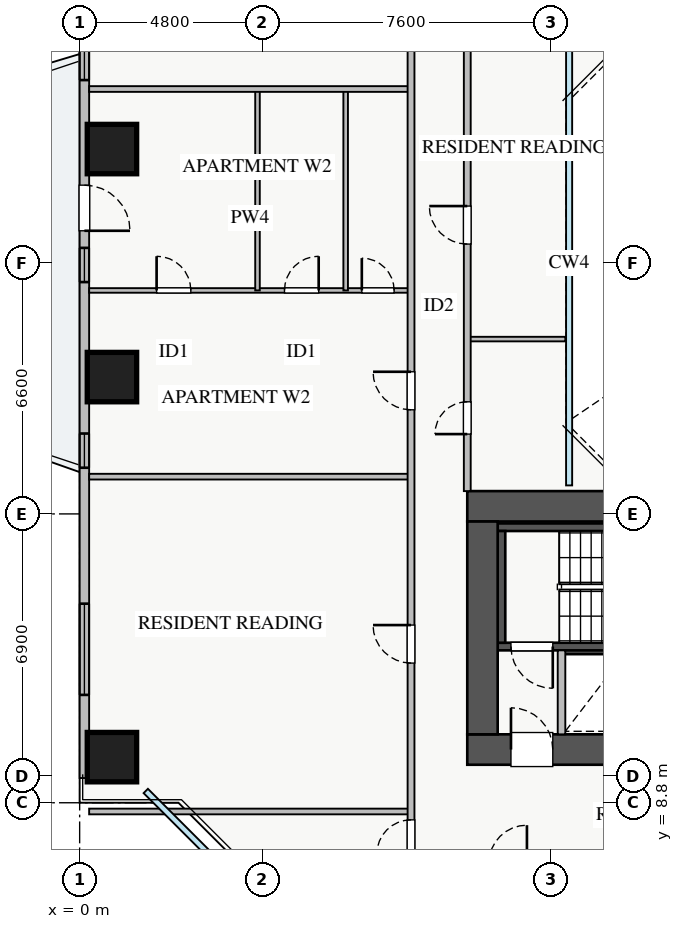
"""IFC4 building model, lengths in metres.
Left out: names, types, materials, properties, quantities, classifications, styles, units other than length and angle.
Written with IfcOpenShell. Run it as: python <this file> out.ifc"""

import sys

from ifc_helpers import new_model, si_unit, direction, frame, frame_2d, origin, origin_2d, place, context, subcontext, project, spatial, rectangle, extrude, source, transform, mapped, element, fill, save


model = new_model("IFC4")
c1 = context("Model", 3, precision=1e-05, world=origin(), true_north=direction((0.0, 1.0)))
c2 = subcontext(c1, "Body", "Model", "MODEL_VIEW")
j1 = project(units=[si_unit("LENGTHUNIT", "METRE"), si_unit("PLANEANGLEUNIT", "RADIAN")], contexts=[c1])
p1 = place(None, origin())
s1 = spatial("IfcSite", under=j1, at=p1, CompositionType="ELEMENT")
p2 = place(p1, origin())
s2 = spatial("IfcBuilding", under=s1, at=p2, CompositionType="ELEMENT")
p3 = place(p2, frame((0.0, 0.0, 39.25)))
s3 = spatial("IfcBuildingStorey", under=s2, at=p3, CompositionType="ELEMENT", Elevation=39.25)
p4 = place(p3, frame((12.68, 12.8, 0.0), z_axis=(0.0, 0.0, 1.0), x_axis=(1.0, 0.0, 0.0)))
e1 = element("IfcWall", 1, at=p4, inside=s3, PredefinedType="SHEAR", context=c2, shape_type="SweptSolid", body=[
    extrude(rectangle(XDim=1.94, YDim=0.18, at=frame_2d((0.97, 0.0))), origin(), (0.0, 0.0, 1.0), 3.07),
])
p5 = place(p3, frame((11.0, 12.91, 0.0), z_axis=(0.0, 0.0, 1.0), x_axis=(1.0, 0.0, 0.0)))
e2 = element("IfcWall", 2, at=p5, inside=s3, PredefinedType="SHEAR", context=c2, shape_type="SweptSolid", body=[
    extrude(rectangle(XDim=7.15, YDim=0.2, at=frame_2d((3.575, 0.0))), origin(), (0.0, 0.0, 1.0), 3.25),
])
p6 = place(p5, frame((0.35, 0.0, 0.0)))
e3 = element("IfcOpeningElement", 3, at=p6, cuts=e2, PredefinedType="OPENING", context=c2, shape_type="SweptSolid", body=[
    extrude(rectangle(XDim=1.1, YDim=2.05, at=frame_2d((0.55, 1.025))), frame((0.0, 0.11, 0.0), z_axis=(0.0, -1.0, 0.0), x_axis=(1.0, 0.0, 0.0)), (0.0, 0.0, 1.0), 0.22),
])
p7 = place(p3, frame((11.0, 16.05, 0.0), z_axis=(0.0, 0.0, 1.0), x_axis=(1.0, 0.0, 0.0)))
e4 = element("IfcWall", 4, at=p7, inside=s3, PredefinedType="SHEAR", context=c2, shape_type="SweptSolid", body=[
    extrude(rectangle(XDim=7.15, YDim=0.2, at=frame_2d((3.575, 0.0))), origin(), (0.0, 0.0, 1.0), 3.25),
])
p8 = place(p3, frame((11.1, 13.01, 0.0), z_axis=(0.0, 0.0, 1.0), x_axis=(0.0, 1.0, 0.0)))
e5 = element("IfcWall", 5, at=p8, inside=s3, PredefinedType="SHEAR", context=c2, shape_type="SweptSolid", body=[
    extrude(rectangle(XDim=2.94, YDim=0.2, at=frame_2d((1.47, 0.0))), origin(), (0.0, 0.0, 1.0), 3.25),
])
p9 = place(p3, frame((10.2, 10.2, 0.0), z_axis=(0.0, 0.0, 1.0), x_axis=(1.0, 0.0, 0.0)))
e6 = element("IfcWall", 6, at=p9, inside=s3, PredefinedType="SHEAR", context=c2, shape_type="SweptSolid", body=[
    extrude(rectangle(XDim=17.6, YDim=0.8, at=frame_2d((8.8, 0.0))), origin(), (0.0, 0.0, 1.0), 3.25),
])
p10 = place(p9, frame((1.15, 0.0, 0.0)))
e7 = element("IfcOpeningElement", 7, at=p10, cuts=e6, PredefinedType="OPENING", context=c2, shape_type="SweptSolid", body=[
    extrude(rectangle(XDim=1.1, YDim=2.05, at=frame_2d((0.55, 1.025))), frame((0.0, 0.41, 0.0), z_axis=(0.0, -1.0, 0.0), x_axis=(1.0, 0.0, 0.0)), (0.0, 0.0, 1.0), 0.82),
])
p11 = place(p9, frame((8.3, 0.0, 0.0)))
e8 = element("IfcOpeningElement", 8, at=p11, cuts=e6, PredefinedType="OPENING", context=c2, shape_type="SweptSolid", body=[
    extrude(rectangle(XDim=1.1, YDim=2.05, at=frame_2d((0.55, 1.025))), frame((0.0, 0.41, 0.0), z_axis=(0.0, -1.0, 0.0), x_axis=(1.0, 0.0, 0.0)), (0.0, 0.0, 1.0), 0.82),
])
p12 = place(p9, frame((10.05, 0.0, 0.0)))
e9 = element("IfcOpeningElement", 9, at=p12, cuts=e6, PredefinedType="OPENING", context=c2, shape_type="SweptSolid", body=[
    extrude(rectangle(XDim=1.1, YDim=2.05, at=frame_2d((0.55, 1.025))), frame((0.0, 0.41, 0.0), z_axis=(0.0, -1.0, 0.0), x_axis=(1.0, 0.0, 0.0)), (0.0, 0.0, 1.0), 0.82),
])
p13 = place(p9, frame((14.74, 0.0, 0.0)))
e10 = element("IfcOpeningElement", 10, at=p13, cuts=e6, PredefinedType="OPENING", context=c2, shape_type="SweptSolid", body=[
    extrude(rectangle(XDim=1.0, YDim=2.05, at=frame_2d((0.5, 1.025))), frame((0.0, 0.41, 0.0), z_axis=(0.0, -1.0, 0.0), x_axis=(1.0, 0.0, 0.0)), (0.0, 0.0, 1.0), 0.82),
])
p14 = place(p9, frame((12.585, 0.0, 0.0)))
e11 = element("IfcOpeningElement", 11, at=p14, cuts=e6, PredefinedType="OPENING", context=c2, shape_type="SweptSolid", body=[
    extrude(rectangle(XDim=1.0, YDim=2.05, at=frame_2d((0.5, 1.025))), frame((0.0, 0.41, 0.0), z_axis=(0.0, -1.0, 0.0), x_axis=(1.0, 0.0, 0.0)), (0.0, 0.0, 1.0), 0.82),
])
p15 = place(p3, frame((10.2, 16.6, 0.0), z_axis=(0.0, 0.0, 1.0), x_axis=(1.0, 0.0, 0.0)))
e12 = element("IfcWall", 12, at=p15, inside=s3, PredefinedType="SHEAR", context=c2, shape_type="SweptSolid", body=[
    extrude(rectangle(XDim=17.6, YDim=0.8, at=frame_2d((8.8, 0.0))), origin(), (0.0, 0.0, 1.0), 3.25),
])
p16 = place(p3, frame((10.6, 10.6, 0.0), z_axis=(0.0, 0.0, 1.0), x_axis=(0.0, 1.0, 0.0)))
e13 = element("IfcWall", 13, at=p16, inside=s3, PredefinedType="SHEAR", context=c2, shape_type="SweptSolid", body=[
    extrude(rectangle(XDim=5.6, YDim=0.8, at=frame_2d((2.8, 0.0))), origin(), (0.0, 0.0, 1.0), 3.25),
])
m1 = source(origin(), c2, "Body", "SweptSolid", [
    extrude(rectangle(XDim=1.3, YDim=1.3, at=origin_2d()), origin(), (0.0, 0.0, 1.0), 3.25),
])
for number, where, z_axis, x_axis in (
    (14, (0.85, 26.0, 0.0), (0.0, 0.0, 1.0), (1.0, 0.0, 0.0)),
    (15, (0.85, 20.0, 0.0), (0.0, 0.0, 1.0), (1.0, 0.0, 0.0)),
    (16, (0.85, 10.0, 0.0), (0.0, 0.0, 1.0), (1.0, 0.0, 0.0)),
):
    element("IfcColumn", number, at=place(p3, frame(where, z_axis=z_axis, x_axis=x_axis)), inside=s3, PredefinedType="COLUMN", context=c2, shape_type="MappedRepresentation", body=[
        mapped(m1, transform((0.0, 0.0, 0.0), x_axis=(1.0, 0.0, 0.0), y_axis=(0.0, 1.0, 0.0), z_axis=(0.0, 0.0, 1.0), scale=1.0)),
    ])
p17 = place(p3, frame((0.125, 9.45, 0.0), z_axis=(0.0, 0.0, 1.0), x_axis=(0.0, 1.0, 0.0)))
e17 = element("IfcWall", 17, at=p17, inside=s3, PredefinedType="STANDARD", context=c2, shape_type="SweptSolid", body=[
    extrude(rectangle(XDim=27.1, YDim=0.25, at=frame_2d((13.55, 0.0))), origin(), (0.0, 0.0, 1.0), 2.61),
])
p18 = place(p17, frame((14.4, 0.0, 0.0)))
e18 = element("IfcOpeningElement", 18, at=p18, cuts=e17, PredefinedType="OPENING", context=c2, shape_type="SweptSolid", body=[
    extrude(rectangle(XDim=1.2, YDim=2.1, at=frame_2d((0.6, 1.05))), frame((0.0, 0.135, 0.0), z_axis=(0.0, -1.0, 0.0), x_axis=(1.0, 0.0, 0.0)), (0.0, 0.0, 1.0), 0.27),
])
p19 = place(p17, frame((2.188, 0.0, 0.9)))
e19 = element("IfcOpeningElement", 19, at=p19, cuts=e17, PredefinedType="OPENING", context=c2, shape_type="SweptSolid", body=[
    extrude(rectangle(XDim=2.4, YDim=1.48, at=frame_2d((1.2, 0.74))), frame((0.0, 0.135, 0.0), z_axis=(0.0, -1.0, 0.0), x_axis=(1.0, 0.0, 0.0)), (0.0, 0.0, 1.0), 0.27),
])
p20 = place(p17, frame((23.272, 0.0, 0.9)))
e20 = element("IfcOpeningElement", 20, at=p20, cuts=e17, PredefinedType="OPENING", context=c2, shape_type="SweptSolid", body=[
    extrude(rectangle(XDim=2.1, YDim=1.5, at=frame_2d((1.05, 0.75))), frame((0.0, 0.135, 0.0), z_axis=(0.0, -1.0, 0.0), x_axis=(1.0, 0.0, 0.0)), (0.0, 0.0, 1.0), 0.27),
])
p21 = place(p17, frame((13.05, 0.0, 0.9)))
e21 = element("IfcOpeningElement", 21, at=p21, cuts=e17, PredefinedType="OPENING", context=c2, shape_type="SweptSolid", body=[
    extrude(rectangle(XDim=0.9, YDim=1.2, at=frame_2d((0.45, 0.6))), frame((0.0, 0.135, 0.0), z_axis=(0.0, -1.0, 0.0), x_axis=(1.0, 0.0, 0.0)), (0.0, 0.0, 1.0), 0.27),
])
p22 = place(p17, frame((8.165, 0.0, 0.9)))
e22 = element("IfcOpeningElement", 22, at=p22, cuts=e17, PredefinedType="OPENING", context=c2, shape_type="SweptSolid", body=[
    extrude(rectangle(XDim=0.9, YDim=1.2, at=frame_2d((0.45, 0.6))), frame((0.0, 0.135, 0.0), z_axis=(0.0, -1.0, 0.0), x_axis=(1.0, 0.0, 0.0)), (0.0, 0.0, 1.0), 0.27),
])
p23 = place(p17, frame((18.365, 0.0, 0.9)))
e23 = element("IfcOpeningElement", 23, at=p23, cuts=e17, PredefinedType="OPENING", context=c2, shape_type="SweptSolid", body=[
    extrude(rectangle(XDim=0.9, YDim=1.2, at=frame_2d((0.45, 0.6))), frame((0.0, 0.135, 0.0), z_axis=(0.0, -1.0, 0.0), x_axis=(1.0, 0.0, 0.0)), (0.0, 0.0, 1.0), 0.27),
])
p24 = place(p3, frame((12.68, 10.6, 0.0), z_axis=(0.0, 0.0, 1.0), x_axis=(0.0, 1.0, 0.0)))
e24 = element("IfcWall", 24, at=p24, inside=s3, PredefinedType="PARTITIONING", context=c2, shape_type="SweptSolid", body=[
    extrude(rectangle(XDim=2.21, YDim=0.2, at=frame_2d((1.105, 0.0))), origin(), (0.0, 0.0, 1.0), 3.07),
])
p25 = place(p3, frame((0.25, 8.57, 0.0), z_axis=(0.0, 0.0, 1.0), x_axis=(1.0, 0.0, 0.0)))
e25 = element("IfcWall", 25, at=p25, inside=s3, PredefinedType="PARTITIONING", context=c2, shape_type="SweptSolid", body=[
    extrude(rectangle(XDim=8.47, YDim=0.15, at=frame_2d((4.235, 0.0))), origin(), (0.0, 0.0, 1.0), 3.07),
])
p26 = place(p3, frame((0.25, 22.28, 0.0), z_axis=(0.0, 0.0, 1.0), x_axis=(1.0, 0.0, 0.0)))
e26 = element("IfcWall", 26, at=p26, inside=s3, PredefinedType="PLUMBINGWALL", context=c2, shape_type="SweptSolid", body=[
    extrude(rectangle(XDim=8.47, YDim=0.12, at=frame_2d((4.235, 0.0))), origin(), (0.0, 0.0, 1.0), 3.07),
])
p27 = place(p26, frame((1.775, 0.0, 0.0)))
e27 = element("IfcOpeningElement", 27, at=p27, cuts=e26, PredefinedType="OPENING", context=c2, shape_type="SweptSolid", body=[
    extrude(rectangle(XDim=0.9, YDim=2.05, at=frame_2d((0.45, 1.025))), frame((0.0, 0.07, 0.0), z_axis=(0.0, -1.0, 0.0), x_axis=(1.0, 0.0, 0.0)), (0.0, 0.0, 1.0), 0.14),
])
p28 = place(p26, frame((5.14, 0.0, 0.0)))
e28 = element("IfcOpeningElement", 28, at=p28, cuts=e26, PredefinedType="OPENING", context=c2, shape_type="SweptSolid", body=[
    extrude(rectangle(XDim=0.9, YDim=2.05, at=frame_2d((0.45, 1.025))), frame((0.0, 0.07, 0.0), z_axis=(0.0, -1.0, 0.0), x_axis=(1.0, 0.0, 0.0)), (0.0, 0.0, 1.0), 0.14),
])
p29 = place(p26, frame((7.175, 0.0, 0.0)))
e29 = element("IfcOpeningElement", 29, at=p29, cuts=e26, PredefinedType="OPENING", context=c2, shape_type="SweptSolid", body=[
    extrude(rectangle(XDim=0.85, YDim=2.05, at=frame_2d((0.425, 1.025))), frame((0.0, 0.07, 0.0), z_axis=(0.0, -1.0, 0.0), x_axis=(1.0, 0.0, 0.0)), (0.0, 0.0, 1.0), 0.14),
])
for number, where, z_axis, x_axis in (
    (30, (4.68, 22.28, 0.0), (0.0, 0.0, 1.0), (0.0, 1.0, 0.0)),
    (31, (7.0, 22.28, 0.0), (0.0, 0.0, 1.0), (0.0, 1.0, 0.0)),
):
    element("IfcWall", number, at=place(p3, frame(where, z_axis=z_axis, x_axis=x_axis)), inside=s3, PredefinedType="PLUMBINGWALL", context=c2, shape_type="SweptSolid", body=[
        extrude(rectangle(XDim=5.3, YDim=0.12, at=frame_2d((2.65, 0.0))), origin(), (0.0, 0.0, 1.0), 3.07),
    ])
for number, where, z_axis, x_axis in (
    (32, (0.25, 17.38, 0.0), (0.0, 0.0, 1.0), (1.0, 0.0, 0.0)),
    (33, (0.25, 27.58, 0.0), (0.0, 0.0, 1.0), (1.0, 0.0, 0.0)),
):
    element("IfcWall", number, at=place(p3, frame(where, z_axis=z_axis, x_axis=x_axis)), inside=s3, PredefinedType="PARTITIONING", context=c2, shape_type="SweptSolid", body=[
        extrude(rectangle(XDim=8.47, YDim=0.15, at=frame_2d((4.235, 0.0))), origin(), (0.0, 0.0, 1.0), 3.07),
    ])
p30 = place(p3, frame((8.72, 7.21, 0.0), z_axis=(0.0, 0.0, 1.0), x_axis=(0.0, 1.0, 0.0)))
e34 = element("IfcWall", 34, at=p30, inside=s3, PredefinedType="PARTITIONING", context=c2, shape_type="SweptSolid", body=[
    extrude(rectangle(XDim=31.23, YDim=0.18, at=frame_2d((15.615, 0.0))), origin(), (0.0, 0.0, 1.0), 3.07),
])
p31 = place(p30, frame((30.09, 0.0, 0.0)))
e35 = element("IfcOpeningElement", 35, at=p31, cuts=e34, PredefinedType="OPENING", context=c2, shape_type="SweptSolid", body=[
    extrude(rectangle(XDim=0.9, YDim=2.05, at=frame_2d((0.45, 1.025))), frame((0.0, 0.1, 0.0), z_axis=(0.0, -1.0, 0.0), x_axis=(1.0, 0.0, 0.0)), (0.0, 0.0, 1.0), 0.2),
])
p32 = place(p30, frame((0.24, 0.0, 0.0)))
e36 = element("IfcOpeningElement", 36, at=p32, cuts=e34, PredefinedType="OPENING", context=c2, shape_type="SweptSolid", body=[
    extrude(rectangle(XDim=0.9, YDim=2.05, at=frame_2d((0.45, 1.025))), frame((0.0, 0.1, 0.0), z_axis=(0.0, -1.0, 0.0), x_axis=(1.0, 0.0, 0.0)), (0.0, 0.0, 1.0), 0.2),
])
p33 = place(p30, frame((5.265, 0.0, 0.0)))
e37 = element("IfcOpeningElement", 37, at=p33, cuts=e34, PredefinedType="OPENING", context=c2, shape_type="SweptSolid", body=[
    extrude(rectangle(XDim=1.0, YDim=2.05, at=frame_2d((0.5, 1.025))), frame((0.0, 0.1, 0.0), z_axis=(0.0, -1.0, 0.0), x_axis=(1.0, 0.0, 0.0)), (0.0, 0.0, 1.0), 0.2),
])
p34 = place(p30, frame((11.93, 0.0, 0.0)))
e38 = element("IfcOpeningElement", 38, at=p34, cuts=e34, PredefinedType="OPENING", context=c2, shape_type="SweptSolid", body=[
    extrude(rectangle(XDim=1.0, YDim=2.05, at=frame_2d((0.5, 1.025))), frame((0.0, 0.1, 0.0), z_axis=(0.0, -1.0, 0.0), x_axis=(1.0, 0.0, 0.0)), (0.0, 0.0, 1.0), 0.2),
])
p35 = place(p30, frame((21.96, 0.0, 0.0)))
e39 = element("IfcOpeningElement", 39, at=p35, cuts=e34, PredefinedType="OPENING", context=c2, shape_type="SweptSolid", body=[
    extrude(rectangle(XDim=1.0, YDim=2.05, at=frame_2d((0.5, 1.025))), frame((0.0, 0.1, 0.0), z_axis=(0.0, -1.0, 0.0), x_axis=(1.0, 0.0, 0.0)), (0.0, 0.0, 1.0), 0.2),
])
p36 = place(p3, frame((10.2, 21.0, 0.0), z_axis=(0.0, 0.0, 1.0), x_axis=(1.0, 0.0, 0.0)))
e40 = element("IfcWall", 40, at=p36, inside=s3, PredefinedType="PLUMBINGWALL", context=c2, shape_type="SweptSolid", body=[
    extrude(rectangle(XDim=2.58, YDim=0.12, at=frame_2d((1.29, 0.0))), origin(), (0.0, 0.0, 1.0), 3.07),
])
p37 = place(p3, frame((10.2, 17.0, 0.0), z_axis=(0.0, 0.0, 1.0), x_axis=(0.0, 1.0, 0.0)))
e41 = element("IfcWall", 41, at=p37, inside=s3, PredefinedType="PARTITIONING", context=c2, shape_type="SweptSolid", body=[
    extrude(rectangle(XDim=12.0, YDim=0.18, at=frame_2d((6.0, 0.0))), origin(), (0.0, 0.0, 1.0), 3.07),
])
p38 = place(p37, frame((1.5, 0.0, 0.0)))
e42 = element("IfcOpeningElement", 42, at=p38, cuts=e41, PredefinedType="OPENING", context=c2, shape_type="SweptSolid", body=[
    extrude(rectangle(XDim=0.85, YDim=2.05, at=frame_2d((0.425, 1.025))), frame((0.0, 0.1, 0.0), z_axis=(0.0, -1.0, 0.0), x_axis=(1.0, 0.0, 0.0)), (0.0, 0.0, 1.0), 0.2),
])
p39 = place(p37, frame((6.5, 0.0, 0.0)))
e43 = element("IfcOpeningElement", 43, at=p39, cuts=e41, PredefinedType="OPENING", context=c2, shape_type="SweptSolid", body=[
    extrude(rectangle(XDim=1.0, YDim=2.05, at=frame_2d((0.5, 1.025))), frame((0.0, 0.1, 0.0), z_axis=(0.0, -1.0, 0.0), x_axis=(1.0, 0.0, 0.0)), (0.0, 0.0, 1.0), 0.2),
])
m2 = source(origin(), c2, "Body", "SweptSolid", [
    extrude(rectangle(XDim=1.2, YDim=2.1, at=frame_2d((0.6, 1.05))), frame((0.0, 0.025, 0.0), z_axis=(0.0, -1.0, 0.0), x_axis=(1.0, 0.0, 0.0)), (0.0, 0.0, 1.0), 0.05),
])
p40 = place(p18, frame((1.2, 0.0, 0.0), z_axis=(0.0, 0.0, 1.0), x_axis=(-1.0, 0.0, 0.0)))
e44 = element("IfcDoor", 44, at=p40, inside=s3, OperationType="SINGLE_SWING_LEFT", PredefinedType="DOOR", context=c2, shape_type="MappedRepresentation", body=[
    mapped(m2, transform((0.0, 0.0, 0.0), x_axis=(1.0, 0.0, 0.0), y_axis=(0.0, 1.0, 0.0), z_axis=(0.0, 0.0, 1.0), scale=1.0)),
])
fill(e18, e44)
m3 = source(origin(), c2, "Body", "SweptSolid", [
    extrude(rectangle(XDim=2.4, YDim=1.48, at=frame_2d((1.2, 0.74))), frame((0.0, 0.03, 0.0), z_axis=(0.0, -1.0, 0.0), x_axis=(1.0, 0.0, 0.0)), (0.0, 0.0, 1.0), 0.06),
])
p41 = place(p19, origin())
e45 = element("IfcWindow", 45, at=p41, inside=s3, PartitioningType="TRIPLE_PANEL_VERTICAL", PredefinedType="WINDOW", context=c2, shape_type="MappedRepresentation", body=[
    mapped(m3, transform((0.0, 0.0, 0.0), x_axis=(1.0, 0.0, 0.0), y_axis=(0.0, 1.0, 0.0), z_axis=(0.0, 0.0, 1.0), scale=1.0)),
])
fill(e19, e45)
m4 = source(origin(), c2, "Body", "SweptSolid", [
    extrude(rectangle(XDim=1.1, YDim=2.05, at=frame_2d((0.55, 1.025))), frame((0.0, 0.025, 0.0), z_axis=(0.0, -1.0, 0.0), x_axis=(1.0, 0.0, 0.0)), (0.0, 0.0, 1.0), 0.05),
])
p42 = place(p10, origin())
e46 = element("IfcDoor", 46, at=p42, inside=s3, OperationType="SINGLE_SWING_LEFT", PredefinedType="DOOR", context=c2, shape_type="MappedRepresentation", body=[
    mapped(m4, transform((0.0, 0.0, 0.0), x_axis=(1.0, 0.0, 0.0), y_axis=(0.0, 1.0, 0.0), z_axis=(0.0, 0.0, 1.0), scale=1.0)),
])
fill(e7, e46)
p43 = place(p6, frame((1.1, 0.0, 0.0), z_axis=(0.0, 0.0, 1.0), x_axis=(-1.0, 0.0, 0.0)))
e47 = element("IfcDoor", 47, at=p43, inside=s3, OperationType="SINGLE_SWING_RIGHT", PredefinedType="DOOR", context=c2, shape_type="MappedRepresentation", body=[
    mapped(m4, transform((0.0, 0.0, 0.0), x_axis=(1.0, 0.0, 0.0), y_axis=(0.0, 1.0, 0.0), z_axis=(0.0, 0.0, 1.0), scale=1.0)),
])
fill(e3, e47)
m5 = source(origin(), c2, "Body", "SweptSolid", [
    extrude(rectangle(XDim=0.9, YDim=2.05, at=frame_2d((0.45, 1.025))), frame((0.0, 0.025, 0.0), z_axis=(0.0, -1.0, 0.0), x_axis=(1.0, 0.0, 0.0)), (0.0, 0.0, 1.0), 0.05),
])
p44 = place(p27, origin())
e48 = element("IfcDoor", 48, at=p44, inside=s3, OperationType="SINGLE_SWING_LEFT", PredefinedType="DOOR", context=c2, shape_type="MappedRepresentation", body=[
    mapped(m5, transform((0.0, 0.0, 0.0), x_axis=(1.0, 0.0, 0.0), y_axis=(0.0, 1.0, 0.0), z_axis=(0.0, 0.0, 1.0), scale=1.0)),
])
fill(e27, e48)
p45 = place(p28, origin())
e49 = element("IfcDoor", 49, at=p45, inside=s3, OperationType="SINGLE_SWING_RIGHT", PredefinedType="DOOR", context=c2, shape_type="MappedRepresentation", body=[
    mapped(m5, transform((0.0, 0.0, 0.0), x_axis=(1.0, 0.0, 0.0), y_axis=(0.0, 1.0, 0.0), z_axis=(0.0, 0.0, 1.0), scale=1.0)),
])
fill(e28, e49)
m6 = source(origin(), c2, "Body", "SweptSolid", [
    extrude(rectangle(XDim=0.85, YDim=2.05, at=frame_2d((0.425, 1.025))), frame((0.0, 0.025, 0.0), z_axis=(0.0, -1.0, 0.0), x_axis=(1.0, 0.0, 0.0)), (0.0, 0.0, 1.0), 0.05),
])
p46 = place(p29, origin())
e50 = element("IfcDoor", 50, at=p46, inside=s3, OperationType="SINGLE_SWING_LEFT", PredefinedType="DOOR", context=c2, shape_type="MappedRepresentation", body=[
    mapped(m6, transform((0.0, 0.0, 0.0), x_axis=(1.0, 0.0, 0.0), y_axis=(0.0, 1.0, 0.0), z_axis=(0.0, 0.0, 1.0), scale=1.0)),
])
fill(e29, e50)
p47 = place(p32, origin())
e51 = element("IfcDoor", 51, at=p47, inside=s3, OperationType="SINGLE_SWING_LEFT", PredefinedType="DOOR", context=c2, shape_type="MappedRepresentation", body=[
    mapped(m5, transform((0.0, 0.0, 0.0), x_axis=(1.0, 0.0, 0.0), y_axis=(0.0, 1.0, 0.0), z_axis=(0.0, 0.0, 1.0), scale=1.0)),
])
fill(e36, e51)
m7 = source(origin(), c2, "Body", "SweptSolid", [
    extrude(rectangle(XDim=1.0, YDim=2.05, at=frame_2d((0.5, 1.025))), frame((0.0, 0.025, 0.0), z_axis=(0.0, -1.0, 0.0), x_axis=(1.0, 0.0, 0.0)), (0.0, 0.0, 1.0), 0.05),
])
p48 = place(p33, origin())
e52 = element("IfcDoor", 52, at=p48, inside=s3, OperationType="SINGLE_SWING_RIGHT", PredefinedType="DOOR", context=c2, shape_type="MappedRepresentation", body=[
    mapped(m7, transform((0.0, 0.0, 0.0), x_axis=(1.0, 0.0, 0.0), y_axis=(0.0, 1.0, 0.0), z_axis=(0.0, 0.0, 1.0), scale=1.0)),
])
fill(e37, e52)
p49 = place(p34, origin())
e53 = element("IfcDoor", 53, at=p49, inside=s3, OperationType="SINGLE_SWING_RIGHT", PredefinedType="DOOR", context=c2, shape_type="MappedRepresentation", body=[
    mapped(m7, transform((0.0, 0.0, 0.0), x_axis=(1.0, 0.0, 0.0), y_axis=(0.0, 1.0, 0.0), z_axis=(0.0, 0.0, 1.0), scale=1.0)),
])
fill(e38, e53)
p50 = place(p38, origin())
e54 = element("IfcDoor", 54, at=p50, inside=s3, OperationType="SINGLE_SWING_LEFT", PredefinedType="DOOR", context=c2, shape_type="MappedRepresentation", body=[
    mapped(m6, transform((0.0, 0.0, 0.0), x_axis=(1.0, 0.0, 0.0), y_axis=(0.0, 1.0, 0.0), z_axis=(0.0, 0.0, 1.0), scale=1.0)),
])
fill(e42, e54)
p51 = place(p39, origin())
e55 = element("IfcDoor", 55, at=p51, inside=s3, OperationType="SINGLE_SWING_RIGHT", PredefinedType="DOOR", context=c2, shape_type="MappedRepresentation", body=[
    mapped(m7, transform((0.0, 0.0, 0.0), x_axis=(1.0, 0.0, 0.0), y_axis=(0.0, 1.0, 0.0), z_axis=(0.0, 0.0, 1.0), scale=1.0)),
])
fill(e43, e55)
m8 = source(origin(), c2, "Body", "SweptSolid", [
    extrude(rectangle(XDim=0.9, YDim=1.2, at=frame_2d((0.45, 0.6))), frame((0.0, 0.03, 0.0), z_axis=(0.0, -1.0, 0.0), x_axis=(1.0, 0.0, 0.0)), (0.0, 0.0, 1.0), 0.06),
])
p52 = place(p21, origin())
e56 = element("IfcWindow", 56, at=p52, inside=s3, PartitioningType="SINGLE_PANEL", PredefinedType="WINDOW", context=c2, shape_type="MappedRepresentation", body=[
    mapped(m8, transform((0.0, 0.0, 0.0), x_axis=(1.0, 0.0, 0.0), y_axis=(0.0, 1.0, 0.0), z_axis=(0.0, 0.0, 1.0), scale=1.0)),
])
fill(e21, e56)
p53 = place(p22, origin())
e57 = element("IfcWindow", 57, at=p53, inside=s3, PartitioningType="SINGLE_PANEL", PredefinedType="WINDOW", context=c2, shape_type="MappedRepresentation", body=[
    mapped(m8, transform((0.0, 0.0, 0.0), x_axis=(1.0, 0.0, 0.0), y_axis=(0.0, 1.0, 0.0), z_axis=(0.0, 0.0, 1.0), scale=1.0)),
])
fill(e22, e57)
p54 = place(p23, origin())
e58 = element("IfcWindow", 58, at=p54, inside=s3, PartitioningType="SINGLE_PANEL", PredefinedType="WINDOW", context=c2, shape_type="MappedRepresentation", body=[
    mapped(m8, transform((0.0, 0.0, 0.0), x_axis=(1.0, 0.0, 0.0), y_axis=(0.0, 1.0, 0.0), z_axis=(0.0, 0.0, 1.0), scale=1.0)),
])
fill(e23, e58)
save(model, sys.argv[1])
